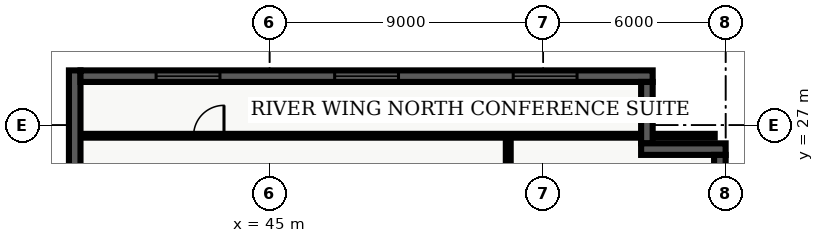
"""IFC4 building model, lengths in metres.
Left out: names, types, materials, properties, quantities, classifications, styles, units other than length and angle.
Written with IfcOpenShell. Run it as: python <this file> out.ifc"""

import sys

from ifc_helpers import new_model, entity, si_unit, converted_unit, direction, frame, origin_with_axes, origin_2d_with_axis, place, context, subcontext, project, spatial, polyline, rectangle, outline, extrude, element, fill, save


model = new_model("IFC4")
c1 = context("Model", 3, precision=1e-05, world=origin_with_axes(), true_north=direction((0.0, 1.0)))
c2 = subcontext(c1, "Body", "Model", "MODEL_VIEW")
j1 = project(units=[si_unit("LENGTHUNIT", "METRE"), converted_unit("PLANEANGLEUNIT", "DEGREE", entity("IfcPlaneAngleMeasure", 0.017), si_unit("PLANEANGLEUNIT", "RADIAN"), dimensions=[0, 0, 0, 0, 0, 0, 0])], contexts=[c1])
p1 = place(None, origin_with_axes())
s1 = spatial("IfcSite", under=j1, at=p1, CompositionType="ELEMENT")
p2 = place(p1, origin_with_axes())
s2 = spatial("IfcBuilding", under=s1, at=p2, CompositionType="ELEMENT")
p3 = place(p2, frame((0.0, 0.0, 52.2), z_axis=(0.0, 0.0, 1.0), x_axis=(1.0, 0.0, 0.0)))
s3 = spatial("IfcBuildingStorey", under=s2, at=p3, CompositionType="ELEMENT", Elevation=52.2)
p4 = place(p3, frame((52.85, 7.85, 0.0), z_axis=(0.0, 0.0, 1.0), x_axis=(0.0, 1.0, 0.0)))
e1 = element("IfcWall", 1, at=p4, inside=s3, PredefinedType="PARTITIONING", context=c2, shape_type="SweptSolid", body=[
    extrude(outline(polyline([(0.0, -0.08), (18.8, -0.08), (18.8, 0.08), (0.0, 0.08), (0.0, -0.08)])), origin_with_axes(), (0.0, 0.0, 1.0), 2.7),
])
p5 = place(p4, frame((4.484, 0.0, 0.0), z_axis=(0.0, 0.0, 1.0), x_axis=(1.0, 0.0, 0.0)))
e2 = element("IfcOpeningElement", 2, at=p5, cuts=e1, PredefinedType="OPENING", context=c2, shape_type="SweptSolid", body=[
    extrude(rectangle(XDim=1.0, YDim=0.18, at=origin_2d_with_axis()), origin_with_axes(), (0.0, 0.0, 1.0), 2.15),
])
p6 = place(p4, frame((7.687, 0.0, 0.0), z_axis=(0.0, 0.0, 1.0), x_axis=(1.0, 0.0, 0.0)))
e3 = element("IfcOpeningElement", 3, at=p6, cuts=e1, PredefinedType="OPENING", context=c2, shape_type="SweptSolid", body=[
    extrude(rectangle(XDim=1.0, YDim=0.18, at=origin_2d_with_axis()), origin_with_axes(), (0.0, 0.0, 1.0), 2.15),
])
p7 = place(p4, frame((13.79, 0.0, 0.0), z_axis=(0.0, 0.0, 1.0), x_axis=(1.0, 0.0, 0.0)))
e4 = element("IfcOpeningElement", 4, at=p7, cuts=e1, PredefinedType="OPENING", context=c2, shape_type="SweptSolid", body=[
    extrude(rectangle(XDim=1.0, YDim=0.18, at=origin_2d_with_axis()), origin_with_axes(), (0.0, 0.0, 1.0), 2.15),
])
p8 = place(p3, frame((38.76, 26.65, 0.0), z_axis=(0.0, 0.0, 1.0), x_axis=(1.0, 0.0, 0.0)))
e5 = element("IfcWall", 5, at=p8, inside=s3, PredefinedType="PARTITIONING", context=c2, shape_type="SweptSolid", body=[
    extrude(outline(polyline([(0.0, -0.062), (20.88, -0.062), (20.88, 0.062), (0.0, 0.062), (0.0, -0.062)])), origin_with_axes(), (0.0, 0.0, 1.0), 2.7),
])
p9 = place(p8, frame((4.24, 0.0, 0.0), z_axis=(0.0, 0.0, 1.0), x_axis=(1.0, 0.0, 0.0)))
e6 = element("IfcOpeningElement", 6, at=p9, cuts=e5, PredefinedType="OPENING", context=c2, shape_type="SweptSolid", body=[
    extrude(rectangle(XDim=1.0, YDim=0.145, at=origin_2d_with_axis()), origin_with_axes(), (0.0, 0.0, 1.0), 2.15),
])
p10 = place(p3, frame((38.59, 21.22, 0.0), z_axis=(0.0, 0.0, 1.0), x_axis=(0.0, 1.0, 0.0)))
e7 = element("IfcWall", 7, at=p10, inside=s3, PredefinedType="SOLIDWALL", context=c2, shape_type="SweptSolid", body=[
    extrude(outline(polyline([(0.0, -0.19), (7.58, -0.19), (7.58, 0.19), (0.0, 0.19), (0.0, -0.19)])), origin_with_axes(), (0.0, 0.0, 1.0), 3.66),
])
p11 = place(p3, frame((38.78, 28.61, 0.0), z_axis=(0.0, 0.0, 1.0), x_axis=(1.0, 0.0, 0.0)))
e8 = element("IfcWall", 8, at=p11, inside=s3, PredefinedType="SOLIDWALL", context=c2, shape_type="SweptSolid", body=[
    extrude(outline(polyline([(0.0, -0.19), (18.82, -0.19), (18.82, 0.19), (0.0, 0.19), (0.0, -0.19)])), origin_with_axes(), (0.0, 0.0, 1.0), 3.66),
])
p12 = place(p11, frame((3.537, 0.0, 0.45), z_axis=(0.0, 0.0, 1.0), x_axis=(1.0, 0.0, 0.0)))
e9 = element("IfcOpeningElement", 9, at=p12, cuts=e8, PredefinedType="OPENING", context=c2, shape_type="SweptSolid", body=[
    extrude(rectangle(XDim=2.1, YDim=0.4, at=origin_2d_with_axis()), origin_with_axes(), (0.0, 0.0, 1.0), 2.2),
])
p13 = place(p11, frame((9.41, 0.0, 0.45), z_axis=(0.0, 0.0, 1.0), x_axis=(1.0, 0.0, 0.0)))
e10 = element("IfcOpeningElement", 10, at=p13, cuts=e8, PredefinedType="OPENING", context=c2, shape_type="SweptSolid", body=[
    extrude(rectangle(XDim=2.1, YDim=0.4, at=origin_2d_with_axis()), origin_with_axes(), (0.0, 0.0, 1.0), 2.2),
])
p14 = place(p11, frame((15.283, 0.0, 0.45), z_axis=(0.0, 0.0, 1.0), x_axis=(1.0, 0.0, 0.0)))
e11 = element("IfcOpeningElement", 11, at=p14, cuts=e8, PredefinedType="OPENING", context=c2, shape_type="SweptSolid", body=[
    extrude(rectangle(XDim=2.1, YDim=0.4, at=origin_2d_with_axis()), origin_with_axes(), (0.0, 0.0, 1.0), 2.2),
])
p15 = place(p3, frame((57.41, 28.42, 0.0), z_axis=(0.0, 0.0, 1.0), x_axis=(0.0, -1.0, 0.0)))
e12 = element("IfcWall", 12, at=p15, inside=s3, PredefinedType="SOLIDWALL", context=c2, shape_type="SweptSolid", body=[
    extrude(outline(polyline([(0.0, -0.19), (2.02, -0.19), (2.02, 0.19), (0.0, 0.19), (0.0, -0.19)])), origin_with_axes(), (0.0, 0.0, 1.0), 3.66),
])
p16 = place(p3, frame((57.22, 26.21, 0.0), z_axis=(0.0, 0.0, 1.0), x_axis=(1.0, 0.0, 0.0)))
e13 = element("IfcWall", 13, at=p16, inside=s3, PredefinedType="SOLIDWALL", context=c2, shape_type="SweptSolid", body=[
    extrude(outline(polyline([(0.0, -0.19), (2.78, -0.19), (2.78, 0.19), (0.0, 0.19), (0.0, -0.19)])), origin_with_axes(), (0.0, 0.0, 1.0), 3.66),
])
p17 = place(p3, frame((59.81, 26.02, 0.0), z_axis=(0.0, 0.0, 1.0), x_axis=(0.0, -1.0, 0.0)))
e14 = element("IfcWall", 14, at=p17, inside=s3, PredefinedType="SOLIDWALL", context=c2, shape_type="SweptSolid", body=[
    extrude(outline(polyline([(0.0, -0.19), (23.62, -0.19), (23.62, 0.19), (0.0, 0.19), (0.0, -0.19)])), origin_with_axes(), (0.0, 0.0, 1.0), 3.66),
])
p18 = place(p17, frame((3.853, 0.0, 0.45), z_axis=(0.0, 0.0, 1.0), x_axis=(1.0, 0.0, 0.0)))
e15 = element("IfcOpeningElement", 15, at=p18, cuts=e14, PredefinedType="OPENING", context=c2, shape_type="SweptSolid", body=[
    extrude(rectangle(XDim=2.1, YDim=0.4, at=origin_2d_with_axis()), origin_with_axes(), (0.0, 0.0, 1.0), 2.2),
])
p19 = place(p17, frame((20.218, 0.0, 0.45), z_axis=(0.0, 0.0, 1.0), x_axis=(1.0, 0.0, 0.0)))
e16 = element("IfcOpeningElement", 16, at=p19, cuts=e14, PredefinedType="OPENING", context=c2, shape_type="SweptSolid", body=[
    extrude(rectangle(XDim=2.1, YDim=0.4, at=origin_2d_with_axis()), origin_with_axes(), (0.0, 0.0, 1.0), 2.2),
])
p20 = place(p8, frame((4.24, 0.0, 0.0), z_axis=(0.0, 0.0, 1.0), x_axis=(1.0, 0.0, 0.0)))
e17 = element("IfcDoor", 17, at=p20, inside=s3, OperationType="SINGLE_SWING_RIGHT", PredefinedType="DOOR", context=c2, shape_type="SweptSolid", body=[
    extrude(rectangle(XDim=1.0, YDim=0.075, at=origin_2d_with_axis()), origin_with_axes(), (0.0, 0.0, 1.0), 2.15),
])
fill(e6, e17)
p21 = place(p11, frame((3.537, 0.0, 0.45), z_axis=(0.0, 0.0, 1.0), x_axis=(1.0, 0.0, 0.0)))
e18 = element("IfcWindow", 18, at=p21, inside=s3, PredefinedType="WINDOW", context=c2, shape_type="SweptSolid", body=[
    extrude(rectangle(XDim=2.1, YDim=0.09, at=origin_2d_with_axis()), origin_with_axes(), (0.0, 0.0, 1.0), 2.2),
])
fill(e9, e18)
p22 = place(p11, frame((9.41, 0.0, 0.45), z_axis=(0.0, 0.0, 1.0), x_axis=(1.0, 0.0, 0.0)))
e19 = element("IfcWindow", 19, at=p22, inside=s3, PredefinedType="WINDOW", context=c2, shape_type="SweptSolid", body=[
    extrude(rectangle(XDim=2.1, YDim=0.09, at=origin_2d_with_axis()), origin_with_axes(), (0.0, 0.0, 1.0), 2.2),
])
fill(e10, e19)
p23 = place(p11, frame((15.283, 0.0, 0.45), z_axis=(0.0, 0.0, 1.0), x_axis=(1.0, 0.0, 0.0)))
e20 = element("IfcWindow", 20, at=p23, inside=s3, PredefinedType="WINDOW", context=c2, shape_type="SweptSolid", body=[
    extrude(rectangle(XDim=2.1, YDim=0.09, at=origin_2d_with_axis()), origin_with_axes(), (0.0, 0.0, 1.0), 2.2),
])
fill(e11, e20)
save(model, sys.argv[1])
